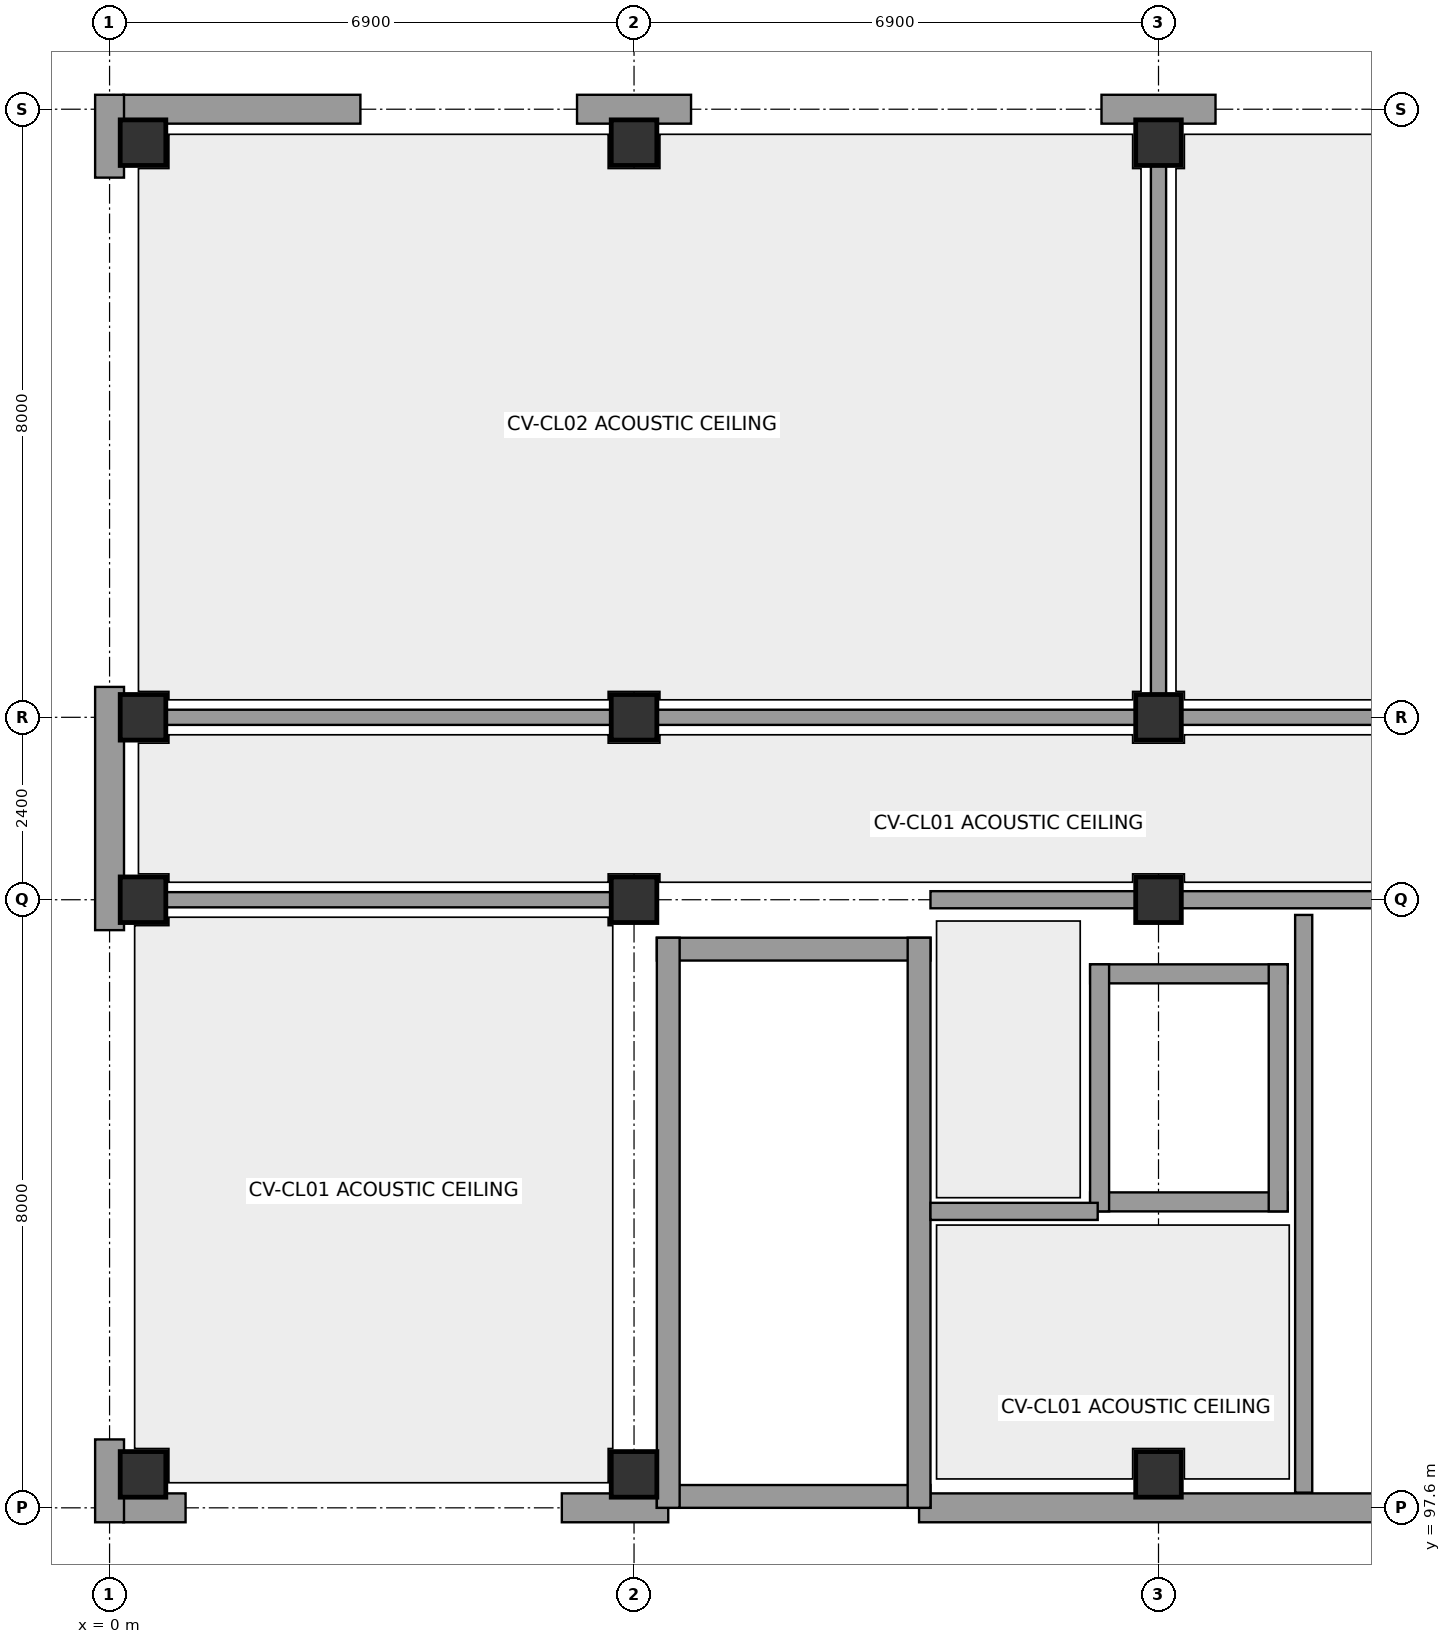
"""IFC4 building model, lengths in metres.
Left out: names, types, materials, properties, quantities, classifications, styles, units other than length and angle.
Written with IfcOpenShell. Run it as: python <this file> out.ifc"""

import sys

from ifc_helpers import new_model, si_unit, direction, frame, frame_2d, origin, origin_with_axes, origin_2d, place, context, subcontext, project, spatial, rectangle, extrude, element, fill, save


model = new_model("IFC4")
c1 = context("Model", 3, precision=1e-05, world=origin(), true_north=direction((0.0, 1.0)))
c2 = subcontext(c1, "Body", "Model", "MODEL_VIEW")
j1 = project(units=[si_unit("LENGTHUNIT", "METRE"), si_unit("PLANEANGLEUNIT", "RADIAN")], contexts=[c1])
p1 = place(None, origin())
s1 = spatial("IfcSite", under=j1, at=p1, CompositionType="ELEMENT")
p2 = place(p1, origin())
s2 = spatial("IfcBuilding", under=s1, at=p2, CompositionType="ELEMENT")
p3 = place(p2, origin())
s3 = spatial("IfcBuildingStorey", under=s2, at=p3, CompositionType="ELEMENT", Elevation=0.0)
for number, where, z_axis, x_axis in (
    (1, (0.44, 98.04, 0.0), (0.0, 0.0, 1.0), (1.0, 0.0, 0.0)),
    (2, (0.44, 105.6, 0.0), (0.0, 0.0, 1.0), (1.0, 0.0, 0.0)),
    (3, (0.44, 108.0, 0.0), (0.0, 0.0, 1.0), (1.0, 0.0, 0.0)),
    (4, (0.44, 115.56, 0.0), (0.0, 0.0, 1.0), (1.0, 0.0, 0.0)),
    (5, (6.9, 98.04, 0.0), (0.0, 0.0, 1.0), (1.0, 0.0, 0.0)),
    (6, (6.9, 105.6, 0.0), (0.0, 0.0, 1.0), (1.0, 0.0, 0.0)),
    (7, (6.9, 108.0, 0.0), (0.0, 0.0, 1.0), (1.0, 0.0, 0.0)),
    (8, (6.9, 115.56, 0.0), (0.0, 0.0, 1.0), (1.0, 0.0, 0.0)),
    (9, (13.8, 98.04, 0.0), (0.0, 0.0, 1.0), (1.0, 0.0, 0.0)),
    (10, (13.8, 105.6, 0.0), (0.0, 0.0, 1.0), (1.0, 0.0, 0.0)),
    (11, (13.8, 108.0, 0.0), (0.0, 0.0, 1.0), (1.0, 0.0, 0.0)),
    (12, (13.8, 115.56, 0.0), (0.0, 0.0, 1.0), (1.0, 0.0, 0.0)),
):
    element("IfcColumn", number, at=place(p3, frame(where, z_axis=z_axis, x_axis=x_axis)), inside=s3, PredefinedType="COLUMN", context=c2, shape_type="SweptSolid", body=[
        extrude(rectangle(XDim=0.6, YDim=0.6, at=origin_2d()), origin(), (0.0, 0.0, 1.0), 4.4),
    ])
p4 = place(p3, frame((0.18, 97.6, 0.0), z_axis=(0.0, 0.0, 1.0), x_axis=(1.0, 0.0, 0.0)))
e13 = element("IfcWall", 13, at=p4, inside=s3, PredefinedType="STANDARD", context=c2, shape_type="SweptSolid", body=[
    extrude(rectangle(XDim=0.82, YDim=0.38, at=frame_2d((0.41, 0.0))), origin(), (0.0, 0.0, 1.0), 4.12),
])
p5 = place(p3, frame((5.95, 97.6, 0.0), z_axis=(0.0, 0.0, 1.0), x_axis=(1.0, 0.0, 0.0)))
e14 = element("IfcWall", 14, at=p5, inside=s3, PredefinedType="STANDARD", context=c2, shape_type="SweptSolid", body=[
    extrude(rectangle(XDim=1.4, YDim=0.38, at=frame_2d((0.7, 0.0))), origin(), (0.0, 0.0, 1.0), 4.12),
])
p6 = place(p3, frame((10.65, 97.6, 0.0), z_axis=(0.0, 0.0, 1.0), x_axis=(1.0, 0.0, 0.0)))
e15 = element("IfcWall", 15, at=p6, inside=s3, PredefinedType="STANDARD", context=c2, shape_type="SweptSolid", body=[
    extrude(rectangle(XDim=11.0, YDim=0.38, at=frame_2d((5.5, 0.0))), origin(), (0.0, 0.0, 1.0), 4.12),
])
p7 = place(p3, frame((0.18, 116.0, 0.0), z_axis=(0.0, 0.0, 1.0), x_axis=(1.0, 0.0, 0.0)))
e16 = element("IfcWall", 16, at=p7, inside=s3, PredefinedType="STANDARD", context=c2, shape_type="SweptSolid", body=[
    extrude(rectangle(XDim=3.12, YDim=0.38, at=frame_2d((1.56, 0.0))), origin(), (0.0, 0.0, 1.0), 4.12),
])
p8 = place(p7, frame((0.87, 0.0, 0.0)))
e17 = element("IfcOpeningElement", 17, at=p8, cuts=e16, PredefinedType="OPENING", context=c2, shape_type="SweptSolid", body=[
    extrude(rectangle(XDim=2.0, YDim=2.45, at=frame_2d((1.0, 1.225))), frame((0.0, 0.202, 0.0), z_axis=(0.0, -1.0, 0.0), x_axis=(1.0, 0.0, 0.0)), (0.0, 0.0, 1.0), 0.404),
])
for number, where, z_axis, x_axis in (
    (18, (6.15, 116.0, 0.0), (0.0, 0.0, 1.0), (1.0, 0.0, 0.0)),
    (19, (13.05, 116.0, 0.0), (0.0, 0.0, 1.0), (1.0, 0.0, 0.0)),
):
    element("IfcWall", number, at=place(p3, frame(where, z_axis=z_axis, x_axis=x_axis)), inside=s3, PredefinedType="STANDARD", context=c2, shape_type="SweptSolid", body=[
        extrude(rectangle(XDim=1.5, YDim=0.38, at=frame_2d((0.75, 0.0))), origin(), (0.0, 0.0, 1.0), 4.12),
    ])
p9 = place(p3, frame((0.0, 97.41, 0.0), z_axis=(0.0, 0.0, 1.0), x_axis=(0.0, 1.0, 0.0)))
e20 = element("IfcWall", 20, at=p9, inside=s3, PredefinedType="STANDARD", context=c2, shape_type="SweptSolid", body=[
    extrude(rectangle(XDim=1.09, YDim=0.38, at=frame_2d((0.545, 0.0))), origin(), (0.0, 0.0, 1.0), 4.12),
])
p10 = place(p3, frame((0.0, 105.2, 0.0), z_axis=(0.0, 0.0, 1.0), x_axis=(0.0, 1.0, 0.0)))
e21 = element("IfcWall", 21, at=p10, inside=s3, PredefinedType="STANDARD", context=c2, shape_type="SweptSolid", body=[
    extrude(rectangle(XDim=3.2, YDim=0.38, at=frame_2d((1.6, 0.0))), origin(), (0.0, 0.0, 1.0), 4.12),
])
p11 = place(p3, frame((0.0, 115.1, 0.0), z_axis=(0.0, 0.0, 1.0), x_axis=(0.0, 1.0, 0.0)))
e22 = element("IfcWall", 22, at=p11, inside=s3, PredefinedType="STANDARD", context=c2, shape_type="SweptSolid", body=[
    extrude(rectangle(XDim=1.09, YDim=0.38, at=frame_2d((0.545, 0.0))), origin(), (0.0, 0.0, 1.0), 4.12),
])
p12 = place(p3, frame((7.2, 97.75, 0.0), z_axis=(0.0, 0.0, 1.0), x_axis=(1.0, 0.0, 0.0)))
e23 = element("IfcWall", 23, at=p12, inside=s3, PredefinedType="SHEAR", context=c2, shape_type="SweptSolid", body=[
    extrude(rectangle(XDim=3.6, YDim=0.3, at=frame_2d((1.8, 0.0))), origin(), (0.0, 0.0, 1.0), 4.12),
])
p13 = place(p12, frame((1.1, 0.0, 0.0)))
e24 = element("IfcOpeningElement", 24, at=p13, cuts=e23, PredefinedType="OPENING", context=c2, shape_type="SweptSolid", body=[
    extrude(rectangle(XDim=1.4, YDim=2.25, at=frame_2d((0.7, 1.125))), frame((0.0, 0.162, 0.0), z_axis=(0.0, -1.0, 0.0), x_axis=(1.0, 0.0, 0.0)), (0.0, 0.0, 1.0), 0.324),
])
p14 = place(p3, frame((7.2, 104.95, 0.0), z_axis=(0.0, 0.0, 1.0), x_axis=(1.0, 0.0, 0.0)))
e25 = element("IfcWall", 25, at=p14, inside=s3, PredefinedType="SHEAR", context=c2, shape_type="SweptSolid", body=[
    extrude(rectangle(XDim=3.6, YDim=0.3, at=frame_2d((1.8, 0.0))), origin(), (0.0, 0.0, 1.0), 4.12),
])
p15 = place(p3, frame((7.35, 97.6, 0.0), z_axis=(0.0, 0.0, 1.0), x_axis=(0.0, 1.0, 0.0)))
e26 = element("IfcWall", 26, at=p15, inside=s3, PredefinedType="SHEAR", context=c2, shape_type="SweptSolid", body=[
    extrude(rectangle(XDim=7.5, YDim=0.3, at=frame_2d((3.75, 0.0))), origin(), (0.0, 0.0, 1.0), 4.12),
])
p16 = place(p3, frame((10.65, 97.6, 0.0), z_axis=(0.0, 0.0, 1.0), x_axis=(0.0, 1.0, 0.0)))
e27 = element("IfcWall", 27, at=p16, inside=s3, PredefinedType="SHEAR", context=c2, shape_type="SweptSolid", body=[
    extrude(rectangle(XDim=7.5, YDim=0.3, at=frame_2d((3.75, 0.0))), origin(), (0.0, 0.0, 1.0), 4.12),
])
p17 = place(p16, frame((0.65, 0.0, 0.0)))
e28 = element("IfcOpeningElement", 28, at=p17, cuts=e27, PredefinedType="OPENING", context=c2, shape_type="SweptSolid", body=[
    extrude(rectangle(XDim=1.15, YDim=2.15, at=frame_2d((0.575, 1.075))), frame((0.0, 0.162, 0.0), z_axis=(0.0, -1.0, 0.0), x_axis=(1.0, 0.0, 0.0)), (0.0, 0.0, 1.0), 0.324),
])
p18 = place(p3, frame((12.9, 101.625, 0.0), z_axis=(0.0, 0.0, 1.0), x_axis=(1.0, 0.0, 0.0)))
e29 = element("IfcWall", 29, at=p18, inside=s3, PredefinedType="SHEAR", context=c2, shape_type="SweptSolid", body=[
    extrude(rectangle(XDim=2.6, YDim=0.25, at=frame_2d((1.3, 0.0))), origin(), (0.0, 0.0, 1.0), 4.12),
])
p19 = place(p18, frame((0.875, 0.0, 0.0)))
e30 = element("IfcOpeningElement", 30, at=p19, cuts=e29, PredefinedType="OPENING", context=c2, shape_type="SweptSolid", body=[
    extrude(rectangle(XDim=1.1, YDim=2.1, at=frame_2d((0.55, 1.05))), frame((0.0, 0.137, 0.0), z_axis=(0.0, -1.0, 0.0), x_axis=(1.0, 0.0, 0.0)), (0.0, 0.0, 1.0), 0.274),
])
p20 = place(p3, frame((12.9, 104.625, 0.0), z_axis=(0.0, 0.0, 1.0), x_axis=(1.0, 0.0, 0.0)))
e31 = element("IfcWall", 31, at=p20, inside=s3, PredefinedType="SHEAR", context=c2, shape_type="SweptSolid", body=[
    extrude(rectangle(XDim=2.6, YDim=0.25, at=frame_2d((1.3, 0.0))), origin(), (0.0, 0.0, 1.0), 4.12),
])
for number, where, z_axis, x_axis in (
    (32, (13.025, 101.5, 0.0), (0.0, 0.0, 1.0), (0.0, 1.0, 0.0)),
    (33, (15.375, 101.5, 0.0), (0.0, 0.0, 1.0), (0.0, 1.0, 0.0)),
):
    element("IfcWall", number, at=place(p3, frame(where, z_axis=z_axis, x_axis=x_axis)), inside=s3, PredefinedType="SHEAR", context=c2, shape_type="SweptSolid", body=[
        extrude(rectangle(XDim=3.25, YDim=0.25, at=frame_2d((1.625, 0.0))), origin(), (0.0, 0.0, 1.0), 4.12),
    ])
p21 = place(p3, frame((15.71, 97.8, 0.0), z_axis=(0.0, 0.0, 1.0), x_axis=(0.0, 1.0, 0.0)))
e34 = element("IfcWall", 34, at=p21, inside=s3, PredefinedType="PARTITIONING", context=c2, shape_type="SweptSolid", body=[
    extrude(rectangle(XDim=7.6, YDim=0.225, at=frame_2d((3.8, 0.0))), origin(), (0.0, 0.0, 1.0), 3.79),
])
p22 = place(p3, frame((10.8, 101.5, 0.0), z_axis=(0.0, 0.0, 1.0), x_axis=(1.0, 0.0, 0.0)))
e35 = element("IfcWall", 35, at=p22, inside=s3, PredefinedType="PARTITIONING", context=c2, shape_type="SweptSolid", body=[
    extrude(rectangle(XDim=2.2, YDim=0.225, at=frame_2d((1.1, 0.0))), origin(), (0.0, 0.0, 1.0), 4.12),
])
p23 = place(p22, frame((0.45, 0.0, 0.0)))
e36 = element("IfcOpeningElement", 36, at=p23, cuts=e35, PredefinedType="OPENING", context=c2, shape_type="SweptSolid", body=[
    extrude(rectangle(XDim=1.1, YDim=2.15, at=frame_2d((0.55, 1.075))), frame((0.0, 0.125, 0.0), z_axis=(0.0, -1.0, 0.0), x_axis=(1.0, 0.0, 0.0)), (0.0, 0.0, 1.0), 0.249),
])
p24 = place(p3, frame((6.9, 105.6, 0.0), z_axis=(0.0, 0.0, 1.0), x_axis=(1.0, 0.0, 0.0)))
e37 = element("IfcWall", 37, at=p24, inside=s3, PredefinedType="PARTITIONING", context=c2, shape_type="SweptSolid", body=[
    extrude(rectangle(XDim=0.3, YDim=0.225, at=frame_2d((0.15, 0.0))), origin(), (0.0, 0.0, 1.0), 4.12),
])
p25 = place(p3, frame((10.8, 105.6, 0.0), z_axis=(0.0, 0.0, 1.0), x_axis=(1.0, 0.0, 0.0)))
e38 = element("IfcWall", 38, at=p25, inside=s3, PredefinedType="PARTITIONING", context=c2, shape_type="SweptSolid", body=[
    extrude(rectangle(XDim=9.9, YDim=0.225, at=frame_2d((4.95, 0.0))), origin(), (0.0, 0.0, 1.0), 3.56),
])
p26 = place(p25, frame((0.475, 0.0, 0.0)))
e39 = element("IfcOpeningElement", 39, at=p26, cuts=e38, PredefinedType="OPENING", context=c2, shape_type="SweptSolid", body=[
    extrude(rectangle(XDim=1.1, YDim=2.15, at=frame_2d((0.55, 1.075))), frame((0.0, 0.125, 0.0), z_axis=(0.0, -1.0, 0.0), x_axis=(1.0, 0.0, 0.0)), (0.0, 0.0, 1.0), 0.249),
])
p27 = place(p25, frame((5.75, 0.0, 0.0)))
e40 = element("IfcOpeningElement", 40, at=p27, cuts=e38, PredefinedType="OPENING", context=c2, shape_type="SweptSolid", body=[
    extrude(rectangle(XDim=0.9, YDim=2.1, at=frame_2d((0.45, 1.05))), frame((0.0, 0.125, 0.0), z_axis=(0.0, -1.0, 0.0), x_axis=(1.0, 0.0, 0.0)), (0.0, 0.0, 1.0), 0.249),
])
p28 = place(p25, frame((7.8, 0.0, 0.0)))
e41 = element("IfcOpeningElement", 41, at=p28, cuts=e38, PredefinedType="OPENING", context=c2, shape_type="SweptSolid", body=[
    extrude(rectangle(XDim=0.95, YDim=2.15, at=frame_2d((0.475, 1.075))), frame((0.0, 0.125, 0.0), z_axis=(0.0, -1.0, 0.0), x_axis=(1.0, 0.0, 0.0)), (0.0, 0.0, 1.0), 0.249),
])
p29 = place(p3, frame((0.3, 108.0, 0.0), z_axis=(0.0, 0.0, 1.0), x_axis=(1.0, 0.0, 0.0)))
e42 = element("IfcWall", 42, at=p29, inside=s3, PredefinedType="PARTITIONING", context=c2, shape_type="SweptSolid", body=[
    extrude(rectangle(XDim=13.35, YDim=0.2, at=frame_2d((6.675, 0.0))), origin(), (0.0, 0.0, 1.0), 3.56),
])
p30 = place(p29, frame((2.0, 0.0, 0.0)))
e43 = element("IfcOpeningElement", 43, at=p30, cuts=e42, PredefinedType="OPENING", context=c2, shape_type="SweptSolid", body=[
    extrude(rectangle(XDim=1.0, YDim=2.15, at=frame_2d((0.5, 1.075))), frame((0.0, 0.112, 0.0), z_axis=(0.0, -1.0, 0.0), x_axis=(1.0, 0.0, 0.0)), (0.0, 0.0, 1.0), 0.224),
])
p31 = place(p3, frame((13.8, 108.15, 0.0), z_axis=(0.0, 0.0, 1.0), x_axis=(0.0, 1.0, 0.0)))
e44 = element("IfcWall", 44, at=p31, inside=s3, PredefinedType="PARTITIONING", context=c2, shape_type="SweptSolid", body=[
    extrude(rectangle(XDim=7.6, YDim=0.2, at=frame_2d((3.8, 0.0))), origin(), (0.0, 0.0, 1.0), 4.12),
])
p32 = place(p3, frame((13.95, 108.0, 0.0), z_axis=(0.0, 0.0, 1.0), x_axis=(1.0, 0.0, 0.0)))
e45 = element("IfcWall", 45, at=p32, inside=s3, PredefinedType="PARTITIONING", context=c2, shape_type="SweptSolid", body=[
    extrude(rectangle(XDim=13.5, YDim=0.2, at=frame_2d((6.75, 0.0))), origin(), (0.0, 0.0, 1.0), 3.56),
])
p33 = place(p32, frame((2.0, 0.0, 0.0)))
e46 = element("IfcOpeningElement", 46, at=p33, cuts=e45, PredefinedType="OPENING", context=c2, shape_type="SweptSolid", body=[
    extrude(rectangle(XDim=1.0, YDim=2.15, at=frame_2d((0.5, 1.075))), frame((0.0, 0.112, 0.0), z_axis=(0.0, -1.0, 0.0), x_axis=(1.0, 0.0, 0.0)), (0.0, 0.0, 1.0), 0.224),
])
p34 = place(p3, frame((0.25, 105.6, 0.0), z_axis=(0.0, 0.0, 1.0), x_axis=(1.0, 0.0, 0.0)))
e47 = element("IfcWall", 47, at=p34, inside=s3, PredefinedType="PARTITIONING", context=c2, shape_type="SweptSolid", body=[
    extrude(rectangle(XDim=6.45, YDim=0.2, at=frame_2d((3.225, 0.0))), origin(), (0.0, 0.0, 1.0), 3.56),
])
p35 = place(p34, frame((1.9, 0.0, 0.0)))
e48 = element("IfcOpeningElement", 48, at=p35, cuts=e47, PredefinedType="OPENING", context=c2, shape_type="SweptSolid", body=[
    extrude(rectangle(XDim=0.95, YDim=2.15, at=frame_2d((0.475, 1.075))), frame((0.0, 0.112, 0.0), z_axis=(0.0, -1.0, 0.0), x_axis=(1.0, 0.0, 0.0)), (0.0, 0.0, 1.0), 0.224),
])
p36 = place(p8, origin_with_axes())
e49 = element("IfcDoor", 49, at=p36, inside=s3, OperationType="DOUBLE_DOOR_SINGLE_SWING", PredefinedType="DOOR", context=c2, shape_type="SweptSolid", body=[
    extrude(rectangle(XDim=2.0, YDim=2.45, at=frame_2d((1.0, 1.225))), frame((0.0, 0.025, 0.0), z_axis=(0.0, -1.0, 0.0), x_axis=(1.0, 0.0, 0.0)), (0.0, 0.0, 1.0), 0.05),
])
fill(e17, e49)
p37 = place(p13, frame((1.4, 0.0, 0.0), z_axis=(0.0, 0.0, 1.0), x_axis=(-1.0, 0.0, 0.0)))
e50 = element("IfcDoor", 50, at=p37, inside=s3, OperationType="DOUBLE_DOOR_SINGLE_SWING", PredefinedType="DOOR", context=c2, shape_type="SweptSolid", body=[
    extrude(rectangle(XDim=1.4, YDim=2.25, at=frame_2d((0.7, 1.125))), frame((0.0, 0.025, 0.0), z_axis=(0.0, -1.0, 0.0), x_axis=(1.0, 0.0, 0.0)), (0.0, 0.0, 1.0), 0.05),
])
fill(e24, e50)
p38 = place(p17, origin_with_axes())
e51 = element("IfcDoor", 51, at=p38, inside=s3, OperationType="SINGLE_SWING_RIGHT", PredefinedType="DOOR", context=c2, shape_type="SweptSolid", body=[
    extrude(rectangle(XDim=1.15, YDim=2.15, at=frame_2d((0.575, 1.075))), frame((0.0, 0.025, 0.0), z_axis=(0.0, -1.0, 0.0), x_axis=(1.0, 0.0, 0.0)), (0.0, 0.0, 1.0), 0.05),
])
fill(e28, e51)
p39 = place(p19, origin_with_axes())
e52 = element("IfcDoor", 52, at=p39, inside=s3, OperationType="SLIDING_TO_LEFT", PredefinedType="DOOR", context=c2, shape_type="SweptSolid", body=[
    extrude(rectangle(XDim=1.1, YDim=2.1, at=frame_2d((0.55, 1.05))), frame((0.0, 0.025, 0.0), z_axis=(0.0, -1.0, 0.0), x_axis=(1.0, 0.0, 0.0)), (0.0, 0.0, 1.0), 0.05),
])
fill(e30, e52)
p40 = place(p23, frame((1.1, 0.0, 0.0), z_axis=(0.0, 0.0, 1.0), x_axis=(-1.0, 0.0, 0.0)))
e53 = element("IfcDoor", 53, at=p40, inside=s3, OperationType="SINGLE_SWING_RIGHT", PredefinedType="DOOR", context=c2, shape_type="SweptSolid", body=[
    extrude(rectangle(XDim=1.1, YDim=2.15, at=frame_2d((0.55, 1.075))), frame((0.0, 0.025, 0.0), z_axis=(0.0, -1.0, 0.0), x_axis=(1.0, 0.0, 0.0)), (0.0, 0.0, 1.0), 0.05),
])
fill(e36, e53)
p41 = place(p26, frame((1.1, 0.0, 0.0), z_axis=(0.0, 0.0, 1.0), x_axis=(-1.0, 0.0, 0.0)))
e54 = element("IfcDoor", 54, at=p41, inside=s3, OperationType="SINGLE_SWING_LEFT", PredefinedType="DOOR", context=c2, shape_type="SweptSolid", body=[
    extrude(rectangle(XDim=1.1, YDim=2.15, at=frame_2d((0.55, 1.075))), frame((0.0, 0.025, 0.0), z_axis=(0.0, -1.0, 0.0), x_axis=(1.0, 0.0, 0.0)), (0.0, 0.0, 1.0), 0.05),
])
fill(e39, e54)
p42 = place(p27, origin_with_axes())
e55 = element("IfcDoor", 55, at=p42, inside=s3, OperationType="SINGLE_SWING_LEFT", PredefinedType="DOOR", context=c2, shape_type="SweptSolid", body=[
    extrude(rectangle(XDim=0.9, YDim=2.1, at=frame_2d((0.45, 1.05))), frame((0.0, 0.025, 0.0), z_axis=(0.0, -1.0, 0.0), x_axis=(1.0, 0.0, 0.0)), (0.0, 0.0, 1.0), 0.05),
])
fill(e40, e55)
p43 = place(p30, frame((1.0, 0.0, 0.0), z_axis=(0.0, 0.0, 1.0), x_axis=(-1.0, 0.0, 0.0)))
e56 = element("IfcDoor", 56, at=p43, inside=s3, OperationType="SINGLE_SWING_LEFT", PredefinedType="DOOR", context=c2, shape_type="SweptSolid", body=[
    extrude(rectangle(XDim=1.0, YDim=2.15, at=frame_2d((0.5, 1.075))), frame((0.0, 0.025, 0.0), z_axis=(0.0, -1.0, 0.0), x_axis=(1.0, 0.0, 0.0)), (0.0, 0.0, 1.0), 0.05),
])
fill(e43, e56)
p44 = place(p33, origin_with_axes())
e57 = element("IfcDoor", 57, at=p44, inside=s3, OperationType="SINGLE_SWING_RIGHT", PredefinedType="DOOR", context=c2, shape_type="SweptSolid", body=[
    extrude(rectangle(XDim=1.0, YDim=2.15, at=frame_2d((0.5, 1.075))), frame((0.0, 0.025, 0.0), z_axis=(0.0, -1.0, 0.0), x_axis=(1.0, 0.0, 0.0)), (0.0, 0.0, 1.0), 0.05),
])
fill(e46, e57)
p45 = place(p35, origin_with_axes())
e58 = element("IfcDoor", 58, at=p45, inside=s3, OperationType="SINGLE_SWING_LEFT", PredefinedType="DOOR", context=c2, shape_type="SweptSolid", body=[
    extrude(rectangle(XDim=0.95, YDim=2.15, at=frame_2d((0.475, 1.075))), frame((0.0, 0.025, 0.0), z_axis=(0.0, -1.0, 0.0), x_axis=(1.0, 0.0, 0.0)), (0.0, 0.0, 1.0), 0.05),
])
fill(e48, e58)
save(model, sys.argv[1])
